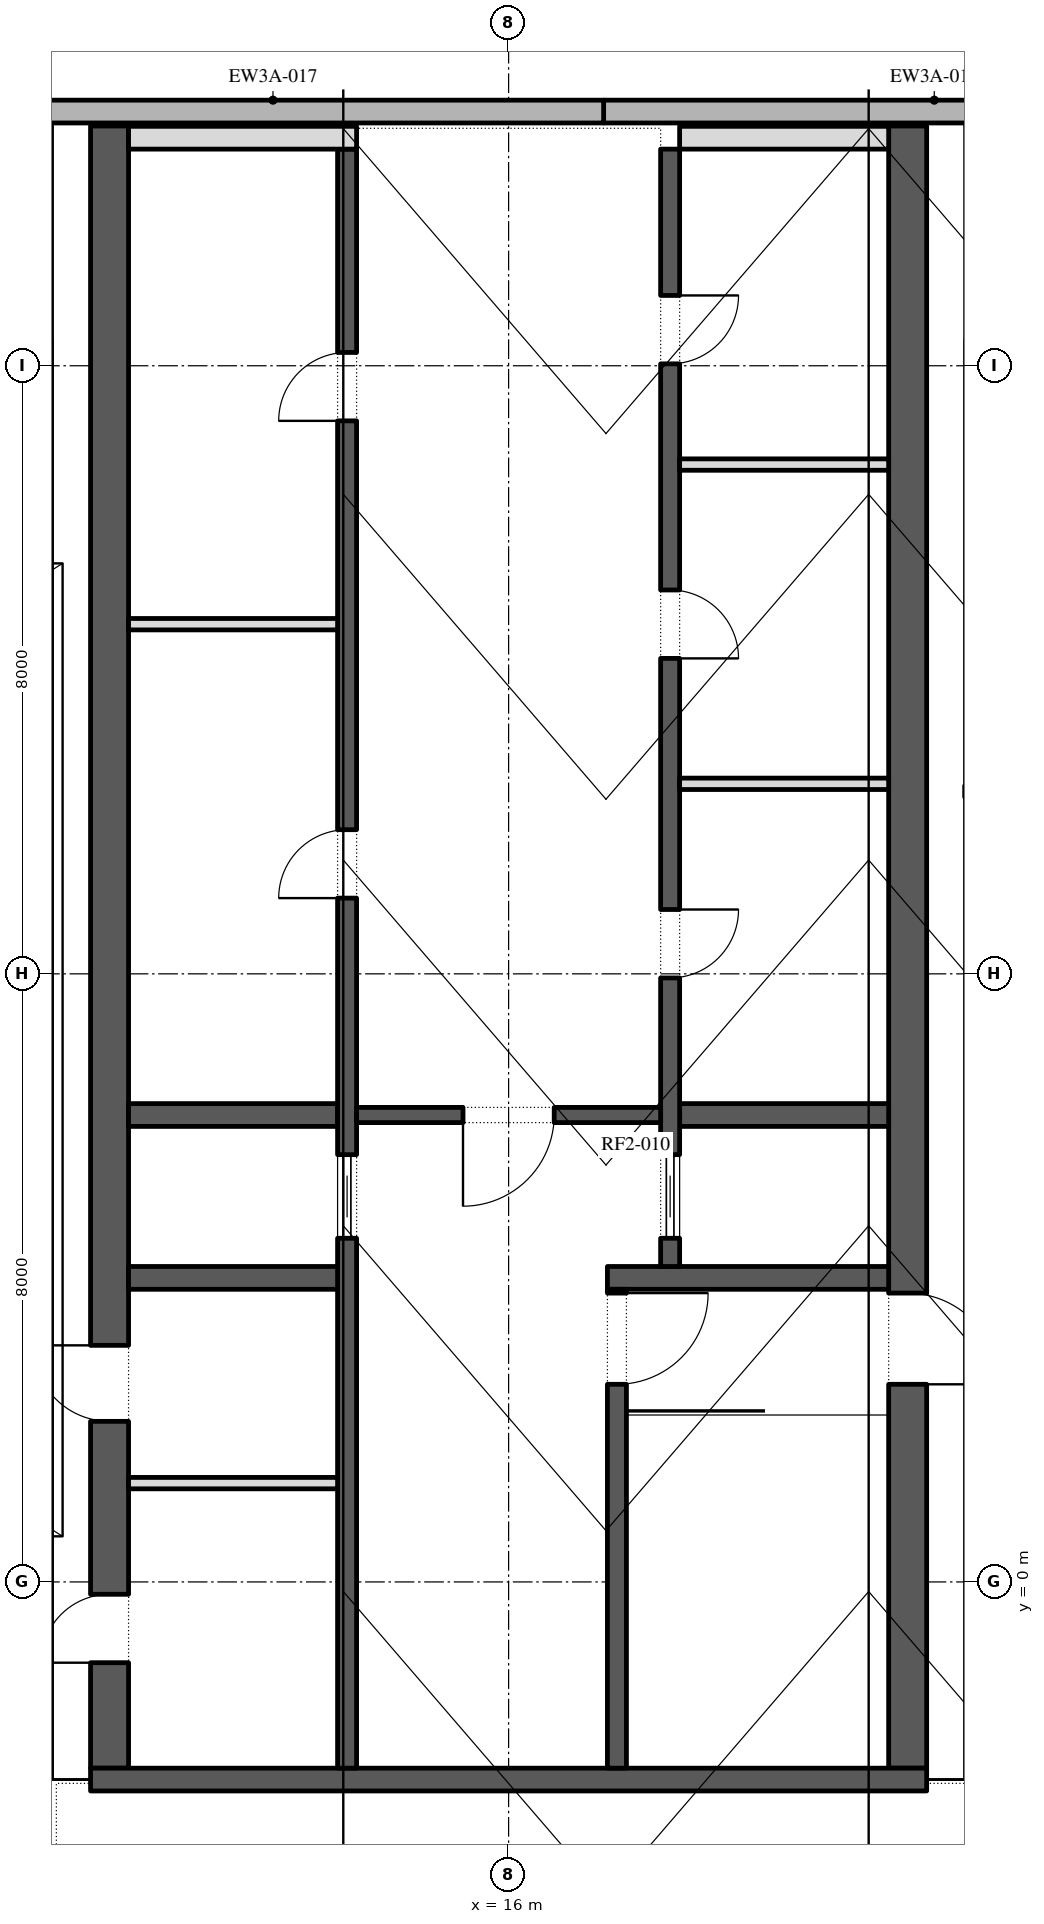
"""IFC4 building model, lengths in metres.
Left out: names, types, materials, properties, quantities, classifications, styles, units other than length and angle.
Written with IfcOpenShell. Run it as: python <this file> out.ifc"""

import sys

from ifc_helpers import new_model, si_unit, direction, frame, frame_2d, origin, place, context, subcontext, project, spatial, polyline, rectangle, outline, extrude, element, fill, save


model = new_model("IFC4")
c1 = context("Model", 3, precision=1e-05, world=origin(), true_north=direction((0.0, 1.0)))
c2 = subcontext(c1, "Body", "Model", "MODEL_VIEW")
j1 = project(units=[si_unit("LENGTHUNIT", "METRE"), si_unit("PLANEANGLEUNIT", "RADIAN")], contexts=[c1])
p1 = place(None, origin())
s1 = spatial("IfcSite", under=j1, at=p1, CompositionType="ELEMENT")
p2 = place(p1, origin())
s2 = spatial("IfcBuilding", under=s1, at=p2, CompositionType="ELEMENT")
p3 = place(p2, frame((0.0, 0.0, 394.2)))
s3 = spatial("IfcBuildingStorey", under=s2, at=p3, CompositionType="ELEMENT", Elevation=394.2)
for number, where, z_axis, x_axis in (
    (1, (25.95, 19.344, 0.0), (0.0, 0.0, 1.0), (-1.0, 0.0, 0.0)),
    (2, (17.25, 19.344, 0.0), (0.0, 0.0, 1.0), (-1.0, 0.0, 0.0)),
):
    element("IfcWall", number, at=place(p3, frame(where, z_axis=z_axis, x_axis=x_axis)), inside=s3, PredefinedType="STANDARD", context=c2, shape_type="SweptSolid", body=[
        extrude(rectangle(XDim=8.7, YDim=0.3, at=frame_2d((4.35, 0.0))), origin(), (0.0, 0.0, 1.0), 2.2),
    ])
p4 = place(p3, frame((21.25, -2.45, 0.0), z_axis=(0.0, 0.0, 1.0), x_axis=(0.0, 1.0, 0.0)))
e3 = element("IfcWall", 3, at=p4, inside=s3, PredefinedType="SHEAR", context=c2, shape_type="SweptSolid", body=[
    extrude(outline(polyline([(0.0, 0.0), (21.604, 0.0), (21.604, 0.754), (16.939, 3.9), (0.0, 3.9), (0.0, 0.0)])), frame((0.0, 0.25, 0.0), z_axis=(0.0, -1.0, 0.0), x_axis=(1.0, 0.0, 0.0)), (0.0, 0.0, 1.0), 0.5),
])
p5 = place(p4, frame((5.05, 0.0, 0.0)))
e4 = element("IfcOpeningElement", 4, at=p5, cuts=e3, PredefinedType="OPENING", context=c2, shape_type="SweptSolid", body=[
    extrude(rectangle(XDim=1.2, YDim=2.1, at=frame_2d((0.6, 1.05))), frame((0.0, 0.26, 0.0), z_axis=(0.0, -1.0, 0.0), x_axis=(1.0, 0.0, 0.0)), (0.0, 0.0, 1.0), 0.52),
])
p6 = place(p3, frame((10.75, -2.45, 0.0), z_axis=(0.0, 0.0, 1.0), x_axis=(0.0, 1.0, 0.0)))
e5 = element("IfcWall", 5, at=p6, inside=s3, PredefinedType="SHEAR", context=c2, shape_type="SweptSolid", body=[
    extrude(outline(polyline([(0.0, 0.0), (21.604, 0.0), (21.604, 0.754), (16.939, 3.9), (0.0, 3.9), (0.0, 0.0)])), frame((0.0, 0.25, 0.0), z_axis=(0.0, -1.0, 0.0), x_axis=(1.0, 0.0, 0.0)), (0.0, 0.0, 1.0), 0.5),
])
p7 = place(p6, frame((1.387, 0.0, 0.0)))
e6 = element("IfcOpeningElement", 6, at=p7, cuts=e5, PredefinedType="OPENING", context=c2, shape_type="SweptSolid", body=[
    extrude(rectangle(XDim=0.9, YDim=2.1, at=frame_2d((0.45, 1.05))), frame((0.0, 0.26, 0.0), z_axis=(0.0, -1.0, 0.0), x_axis=(1.0, 0.0, 0.0)), (0.0, 0.0, 1.0), 0.52),
])
p8 = place(p6, frame((4.562, 0.0, 0.0)))
e7 = element("IfcOpeningElement", 7, at=p8, cuts=e5, PredefinedType="OPENING", context=c2, shape_type="SweptSolid", body=[
    extrude(rectangle(XDim=1.0, YDim=2.1, at=frame_2d((0.5, 1.05))), frame((0.0, 0.26, 0.0), z_axis=(0.0, -1.0, 0.0), x_axis=(1.0, 0.0, 0.0)), (0.0, 0.0, 1.0), 0.52),
])
p9 = place(p3, frame((10.5, -2.6, 0.0), z_axis=(0.0, 0.0, 1.0), x_axis=(1.0, 0.0, 0.0)))
e8 = element("IfcWall", 8, at=p9, inside=s3, PredefinedType="SHEAR", context=c2, shape_type="SweptSolid", body=[
    extrude(rectangle(XDim=11.0, YDim=0.3, at=frame_2d((5.5, 0.0))), origin(), (0.0, 0.0, 1.0), 3.9),
])
p10 = place(p3, frame((17.3, 4.0, 0.0), z_axis=(0.0, 0.0, 1.0), x_axis=(1.0, 0.0, 0.0)))
e9 = element("IfcWall", 9, at=p10, inside=s3, PredefinedType="SHEAR", context=c2, shape_type="SweptSolid", body=[
    extrude(rectangle(XDim=3.7, YDim=0.3, at=frame_2d((1.85, 0.0))), origin(), (0.0, 0.0, 1.0), 3.9),
])
p11 = place(p3, frame((17.425, -2.45, 0.0), z_axis=(0.0, 0.0, 1.0), x_axis=(0.0, 1.0, 0.0)))
e10 = element("IfcWall", 10, at=p11, inside=s3, PredefinedType="SHEAR", context=c2, shape_type="SweptSolid", body=[
    extrude(rectangle(XDim=6.3, YDim=0.25, at=frame_2d((3.15, 0.0))), origin(), (0.0, 0.0, 1.0), 3.9),
])
p12 = place(p11, frame((5.05, 0.0, 0.0)))
e11 = element("IfcOpeningElement", 11, at=p12, cuts=e10, PredefinedType="OPENING", context=c2, shape_type="SweptSolid", body=[
    extrude(rectangle(XDim=1.2, YDim=2.1, at=frame_2d((0.6, 1.05))), frame((0.0, 0.135, 0.0), z_axis=(0.0, -1.0, 0.0), x_axis=(1.0, 0.0, 0.0)), (0.0, 0.0, 1.0), 0.27),
])
p13 = place(p3, frame((18.25, 6.143, 0.0), z_axis=(0.0, 0.0, 1.0), x_axis=(1.0, 0.0, 0.0)))
e12 = element("IfcWall", 12, at=p13, inside=s3, PredefinedType="SHEAR", context=c2, shape_type="SweptSolid", body=[
    extrude(rectangle(XDim=2.75, YDim=0.3, at=frame_2d((1.375, 0.0))), origin(), (0.0, 0.0, 1.0), 3.9),
])
p14 = place(p3, frame((18.125, 4.15, 0.0), z_axis=(0.0, 0.0, 1.0), x_axis=(0.0, 1.0, 0.0)))
e13 = element("IfcWall", 13, at=p14, inside=s3, PredefinedType="SHEAR", context=c2, shape_type="SweptSolid", body=[
    extrude(outline(polyline([(0.0, 0.0), (14.7, 0.0), (14.7, 0.959), (10.339, 3.9), (0.0, 3.9), (0.0, 0.0)])), frame((0.0, 0.125, 0.0), z_axis=(0.0, -1.0, 0.0), x_axis=(1.0, 0.0, 0.0)), (0.0, 0.0, 1.0), 0.25),
])
p15 = place(p14, frame((3.796, 0.0, 0.0)))
e14 = element("IfcOpeningElement", 14, at=p15, cuts=e13, PredefinedType="OPENING", context=c2, shape_type="SweptSolid", body=[
    extrude(rectangle(XDim=0.9, YDim=2.1, at=frame_2d((0.45, 1.05))), frame((0.0, 0.135, 0.0), z_axis=(0.0, -1.0, 0.0), x_axis=(1.0, 0.0, 0.0)), (0.0, 0.0, 1.0), 0.27),
])
p16 = place(p14, frame((8.0, 0.0, 0.0)))
e15 = element("IfcOpeningElement", 15, at=p16, cuts=e13, PredefinedType="OPENING", context=c2, shape_type="SweptSolid", body=[
    extrude(rectangle(XDim=0.9, YDim=2.1, at=frame_2d((0.45, 1.05))), frame((0.0, 0.135, 0.0), z_axis=(0.0, -1.0, 0.0), x_axis=(1.0, 0.0, 0.0)), (0.0, 0.0, 1.0), 0.27),
])
p17 = place(p14, frame((11.875, 0.0, 0.0)))
e16 = element("IfcOpeningElement", 16, at=p17, cuts=e13, PredefinedType="OPENING", context=c2, shape_type="SweptSolid", body=[
    extrude(rectangle(XDim=0.9, YDim=2.1, at=frame_2d((0.45, 1.05))), frame((0.0, 0.135, 0.0), z_axis=(0.0, -1.0, 0.0), x_axis=(1.0, 0.0, 0.0)), (0.0, 0.0, 1.0), 0.27),
])
p18 = place(p14, frame((0.371, 0.0, 0.0)))
e17 = element("IfcOpeningElement", 17, at=p18, cuts=e13, PredefinedType="OPENING", context=c2, shape_type="SweptSolid", body=[
    extrude(rectangle(XDim=1.1, YDim=2.1, at=frame_2d((0.55, 1.05))), frame((0.0, 0.135, 0.0), z_axis=(0.0, -1.0, 0.0), x_axis=(1.0, 0.0, 0.0)), (0.0, 0.0, 1.0), 0.27),
])
p19 = place(p3, frame((18.25, 19.0, 0.0), z_axis=(0.0, 0.0, 1.0), x_axis=(1.0, 0.0, 0.0)))
e18 = element("IfcWall", 18, at=p19, inside=s3, PredefinedType="PARTITIONING", context=c2, shape_type="SweptSolid", body=[
    extrude(outline(polyline([(0.0, 0.0), (2.75, 0.0), (2.75, 0.858), (0.0, 0.858), (0.0, 0.0)])), frame((0.0, 0.15, 0.0), z_axis=(0.0, -1.0, 0.0), x_axis=(1.0, 0.0, 0.0)), (0.0, 0.0, 1.0), 0.3),
])
p20 = place(p3, frame((18.25, 10.5, 0.0), z_axis=(0.0, 0.0, 1.0), x_axis=(1.0, 0.0, 0.0)))
e19 = element("IfcWall", 19, at=p20, inside=s3, PredefinedType="PARTITIONING", context=c2, shape_type="SweptSolid", body=[
    extrude(rectangle(XDim=2.75, YDim=0.15, at=frame_2d((1.375, 0.0))), origin(), (0.0, 0.0, 1.0), 3.9),
])
p21 = place(p3, frame((18.25, 14.7, 0.0), z_axis=(0.0, 0.0, 1.0), x_axis=(1.0, 0.0, 0.0)))
e20 = element("IfcWall", 20, at=p21, inside=s3, PredefinedType="PARTITIONING", context=c2, shape_type="SweptSolid", body=[
    extrude(outline(polyline([(0.0, 0.0), (2.75, 0.0), (2.75, 3.758), (0.0, 3.758), (0.0, 0.0)])), frame((0.0, 0.075, 0.0), z_axis=(0.0, -1.0, 0.0), x_axis=(1.0, 0.0, 0.0)), (0.0, 0.0, 1.0), 0.15),
])
p22 = place(p3, frame((11.0, 4.0, 0.0), z_axis=(0.0, 0.0, 1.0), x_axis=(1.0, 0.0, 0.0)))
e21 = element("IfcWall", 21, at=p22, inside=s3, PredefinedType="SHEAR", context=c2, shape_type="SweptSolid", body=[
    extrude(rectangle(XDim=3.0, YDim=0.3, at=frame_2d((1.5, 0.0))), origin(), (0.0, 0.0, 1.0), 3.9),
])
p23 = place(p3, frame((11.0, 6.143, 0.0), z_axis=(0.0, 0.0, 1.0), x_axis=(1.0, 0.0, 0.0)))
e22 = element("IfcWall", 22, at=p23, inside=s3, PredefinedType="SHEAR", context=c2, shape_type="SweptSolid", body=[
    extrude(rectangle(XDim=2.75, YDim=0.3, at=frame_2d((1.375, 0.0))), origin(), (0.0, 0.0, 1.0), 3.9),
])
p24 = place(p3, frame((13.875, -2.45, 0.0), z_axis=(0.0, 0.0, 1.0), x_axis=(0.0, 1.0, 0.0)))
e23 = element("IfcWall", 23, at=p24, inside=s3, PredefinedType="SHEAR", context=c2, shape_type="SweptSolid", body=[
    extrude(outline(polyline([(0.0, 0.0), (21.3, 0.0), (21.3, 0.959), (16.939, 3.9), (0.0, 3.9), (0.0, 0.0)])), frame((0.0, 0.125, 0.0), z_axis=(0.0, -1.0, 0.0), x_axis=(1.0, 0.0, 0.0)), (0.0, 0.0, 1.0), 0.25),
])
p25 = place(p24, frame((11.446, 0.0, 0.0)))
e24 = element("IfcOpeningElement", 24, at=p25, cuts=e23, PredefinedType="OPENING", context=c2, shape_type="SweptSolid", body=[
    extrude(rectangle(XDim=0.9, YDim=2.1, at=frame_2d((0.45, 1.05))), frame((0.0, 0.135, 0.0), z_axis=(0.0, -1.0, 0.0), x_axis=(1.0, 0.0, 0.0)), (0.0, 0.0, 1.0), 0.27),
])
p26 = place(p24, frame((17.725, 0.0, 0.0)))
e25 = element("IfcOpeningElement", 25, at=p26, cuts=e23, PredefinedType="OPENING", context=c2, shape_type="SweptSolid", body=[
    extrude(rectangle(XDim=0.9, YDim=2.1, at=frame_2d((0.45, 1.05))), frame((0.0, 0.135, 0.0), z_axis=(0.0, -1.0, 0.0), x_axis=(1.0, 0.0, 0.0)), (0.0, 0.0, 1.0), 0.27),
])
p27 = place(p24, frame((6.971, 0.0, 0.0)))
e26 = element("IfcOpeningElement", 26, at=p27, cuts=e23, PredefinedType="OPENING", context=c2, shape_type="SweptSolid", body=[
    extrude(rectangle(XDim=1.1, YDim=2.1, at=frame_2d((0.55, 1.05))), frame((0.0, 0.135, 0.0), z_axis=(0.0, -1.0, 0.0), x_axis=(1.0, 0.0, 0.0)), (0.0, 0.0, 1.0), 0.27),
])
p28 = place(p3, frame((11.0, 19.0, 0.0), z_axis=(0.0, 0.0, 1.0), x_axis=(1.0, 0.0, 0.0)))
e27 = element("IfcWall", 27, at=p28, inside=s3, PredefinedType="PARTITIONING", context=c2, shape_type="SweptSolid", body=[
    extrude(outline(polyline([(0.0, 0.0), (3.0, 0.0), (3.0, 0.858), (0.0, 0.858), (0.0, 0.0)])), frame((0.0, 0.15, 0.0), z_axis=(0.0, -1.0, 0.0), x_axis=(1.0, 0.0, 0.0)), (0.0, 0.0, 1.0), 0.3),
])
p29 = place(p3, frame((11.0, 12.6, 0.0), z_axis=(0.0, 0.0, 1.0), x_axis=(1.0, 0.0, 0.0)))
e28 = element("IfcWall", 28, at=p29, inside=s3, PredefinedType="PARTITIONING", context=c2, shape_type="SweptSolid", body=[
    extrude(rectangle(XDim=2.75, YDim=0.15, at=frame_2d((1.375, 0.0))), origin(), (0.0, 0.0, 1.0), 3.9),
])
p30 = place(p3, frame((14.0, 6.143, 0.0), z_axis=(0.0, 0.0, 1.0), x_axis=(1.0, 0.0, 0.0)))
e29 = element("IfcWall", 29, at=p30, inside=s3, PredefinedType="SHEAR", context=c2, shape_type="SweptSolid", body=[
    extrude(rectangle(XDim=4.0, YDim=0.2, at=frame_2d((2.0, 0.0))), origin(), (0.0, 0.0, 1.0), 3.9),
])
p31 = place(p30, frame((1.4, 0.0, 0.0)))
e30 = element("IfcOpeningElement", 30, at=p31, cuts=e29, PredefinedType="OPENING", context=c2, shape_type="SweptSolid", body=[
    extrude(rectangle(XDim=1.2, YDim=2.1, at=frame_2d((0.6, 1.05))), frame((0.0, 0.11, 0.0), z_axis=(0.0, -1.0, 0.0), x_axis=(1.0, 0.0, 0.0)), (0.0, 0.0, 1.0), 0.22),
])
p32 = place(p3, frame((11.0, 1.3, 0.0), z_axis=(0.0, 0.0, 1.0), x_axis=(1.0, 0.0, 0.0)))
e31 = element("IfcWall", 31, at=p32, inside=s3, PredefinedType="PARTITIONING", context=c2, shape_type="SweptSolid", body=[
    extrude(rectangle(XDim=2.75, YDim=0.15, at=frame_2d((1.375, 0.0))), origin(), (0.0, 0.0, 1.0), 3.9),
])
p33 = place(p15, frame((0.9, -0.2, 0.0), z_axis=(0.0, 0.0, 1.0), x_axis=(-1.0, 0.0, 0.0)))
e32 = element("IfcDoor", 32, at=p33, inside=s3, OperationType="SINGLE_SWING_RIGHT", PredefinedType="DOOR", context=c2, shape_type="SweptSolid", body=[
    extrude(rectangle(XDim=0.9, YDim=2.1, at=frame_2d((0.45, 1.05))), frame((0.0, -0.075, 0.0), z_axis=(0.0, -1.0, 0.0), x_axis=(1.0, 0.0, 0.0)), (0.0, 0.0, 1.0), 0.05),
])
fill(e14, e32)
p34 = place(p16, frame((0.9, -0.2, 0.0), z_axis=(0.0, 0.0, 1.0), x_axis=(-1.0, 0.0, 0.0)))
e33 = element("IfcDoor", 33, at=p34, inside=s3, OperationType="SINGLE_SWING_LEFT", PredefinedType="DOOR", context=c2, shape_type="SweptSolid", body=[
    extrude(rectangle(XDim=0.9, YDim=2.1, at=frame_2d((0.45, 1.05))), frame((0.0, -0.075, 0.0), z_axis=(0.0, -1.0, 0.0), x_axis=(1.0, 0.0, 0.0)), (0.0, 0.0, 1.0), 0.05),
])
fill(e15, e33)
p35 = place(p17, frame((0.9, -0.2, 0.0), z_axis=(0.0, 0.0, 1.0), x_axis=(-1.0, 0.0, 0.0)))
e34 = element("IfcDoor", 34, at=p35, inside=s3, OperationType="SINGLE_SWING_RIGHT", PredefinedType="DOOR", context=c2, shape_type="SweptSolid", body=[
    extrude(rectangle(XDim=0.9, YDim=2.1, at=frame_2d((0.45, 1.05))), frame((0.0, -0.075, 0.0), z_axis=(0.0, -1.0, 0.0), x_axis=(1.0, 0.0, 0.0)), (0.0, 0.0, 1.0), 0.05),
])
fill(e16, e34)
p36 = place(p18, origin())
e35 = element("IfcDoor", 35, at=p36, inside=s3, OperationType="SLIDING_TO_LEFT", PredefinedType="DOOR", context=c2, shape_type="SweptSolid", body=[
    extrude(rectangle(XDim=1.1, YDim=2.1, at=frame_2d((0.55, 1.05))), frame((0.0, 0.025, 0.0), z_axis=(0.0, -1.0, 0.0), x_axis=(1.0, 0.0, 0.0)), (0.0, 0.0, 1.0), 0.05),
])
fill(e17, e35)
p37 = place(p25, origin())
e36 = element("IfcDoor", 36, at=p37, inside=s3, OperationType="SINGLE_SWING_RIGHT", PredefinedType="DOOR", context=c2, shape_type="SweptSolid", body=[
    extrude(rectangle(XDim=0.9, YDim=2.1, at=frame_2d((0.45, 1.05))), frame((0.0, 0.125, 0.0), z_axis=(0.0, -1.0, 0.0), x_axis=(1.0, 0.0, 0.0)), (0.0, 0.0, 1.0), 0.05),
])
fill(e24, e36)
p38 = place(p26, origin())
e37 = element("IfcDoor", 37, at=p38, inside=s3, OperationType="SINGLE_SWING_RIGHT", PredefinedType="DOOR", context=c2, shape_type="SweptSolid", body=[
    extrude(rectangle(XDim=0.9, YDim=2.1, at=frame_2d((0.45, 1.05))), frame((0.0, 0.125, 0.0), z_axis=(0.0, -1.0, 0.0), x_axis=(1.0, 0.0, 0.0)), (0.0, 0.0, 1.0), 0.05),
])
fill(e25, e37)
p39 = place(p27, origin())
e38 = element("IfcDoor", 38, at=p39, inside=s3, OperationType="SLIDING_TO_LEFT", PredefinedType="DOOR", context=c2, shape_type="SweptSolid", body=[
    extrude(rectangle(XDim=1.1, YDim=2.1, at=frame_2d((0.55, 1.05))), frame((0.0, 0.025, 0.0), z_axis=(0.0, -1.0, 0.0), x_axis=(1.0, 0.0, 0.0)), (0.0, 0.0, 1.0), 0.05),
])
fill(e26, e38)
p40 = place(p31, frame((1.2, 0.0, 0.0), z_axis=(0.0, 0.0, 1.0), x_axis=(-1.0, 0.0, 0.0)))
e39 = element("IfcDoor", 39, at=p40, inside=s3, OperationType="SINGLE_SWING_LEFT", PredefinedType="DOOR", context=c2, shape_type="SweptSolid", body=[
    extrude(rectangle(XDim=1.2, YDim=2.1, at=frame_2d((0.6, 1.05))), frame((0.0, 0.025, 0.0), z_axis=(0.0, -1.0, 0.0), x_axis=(1.0, 0.0, 0.0)), (0.0, 0.0, 1.0), 0.05),
])
fill(e30, e39)
p41 = place(p12, frame((1.2, 0.0, 0.0), z_axis=(0.0, 0.0, 1.0), x_axis=(-1.0, 0.0, 0.0)))
e40 = element("IfcDoor", 40, at=p41, inside=s3, OperationType="SINGLE_SWING_RIGHT", PredefinedType="DOOR", context=c2, shape_type="SweptSolid", body=[
    extrude(rectangle(XDim=1.2, YDim=2.1, at=frame_2d((0.6, 1.05))), frame((0.0, 0.025, 0.0), z_axis=(0.0, -1.0, 0.0), x_axis=(1.0, 0.0, 0.0)), (0.0, 0.0, 1.0), 0.05),
])
fill(e11, e40)
p42 = place(p5, frame((1.2, 0.0, 0.0), z_axis=(0.0, 0.0, 1.0), x_axis=(-1.0, 0.0, 0.0)))
e41 = element("IfcDoor", 41, at=p42, inside=s3, OperationType="SINGLE_SWING_LEFT", PredefinedType="DOOR", context=c2, shape_type="SweptSolid", body=[
    extrude(rectangle(XDim=1.2, YDim=2.1, at=frame_2d((0.6, 1.05))), frame((0.0, 0.025, 0.0), z_axis=(0.0, -1.0, 0.0), x_axis=(1.0, 0.0, 0.0)), (0.0, 0.0, 1.0), 0.05),
])
fill(e4, e41)
p43 = place(p7, origin())
e42 = element("IfcDoor", 42, at=p43, inside=s3, OperationType="SINGLE_SWING_RIGHT", PredefinedType="DOOR", context=c2, shape_type="SweptSolid", body=[
    extrude(rectangle(XDim=0.9, YDim=2.1, at=frame_2d((0.45, 1.05))), frame((0.0, -0.2, 0.0), z_axis=(0.0, -1.0, 0.0), x_axis=(1.0, 0.0, 0.0)), (0.0, 0.0, 1.0), 0.05),
])
fill(e6, e42)
p44 = place(p8, origin())
e43 = element("IfcDoor", 43, at=p44, inside=s3, OperationType="SINGLE_SWING_LEFT", PredefinedType="DOOR", context=c2, shape_type="SweptSolid", body=[
    extrude(rectangle(XDim=1.0, YDim=2.1, at=frame_2d((0.5, 1.05))), frame((0.0, -0.2, 0.0), z_axis=(0.0, -1.0, 0.0), x_axis=(1.0, 0.0, 0.0)), (0.0, 0.0, 1.0), 0.05),
])
fill(e7, e43)
save(model, sys.argv[1])
